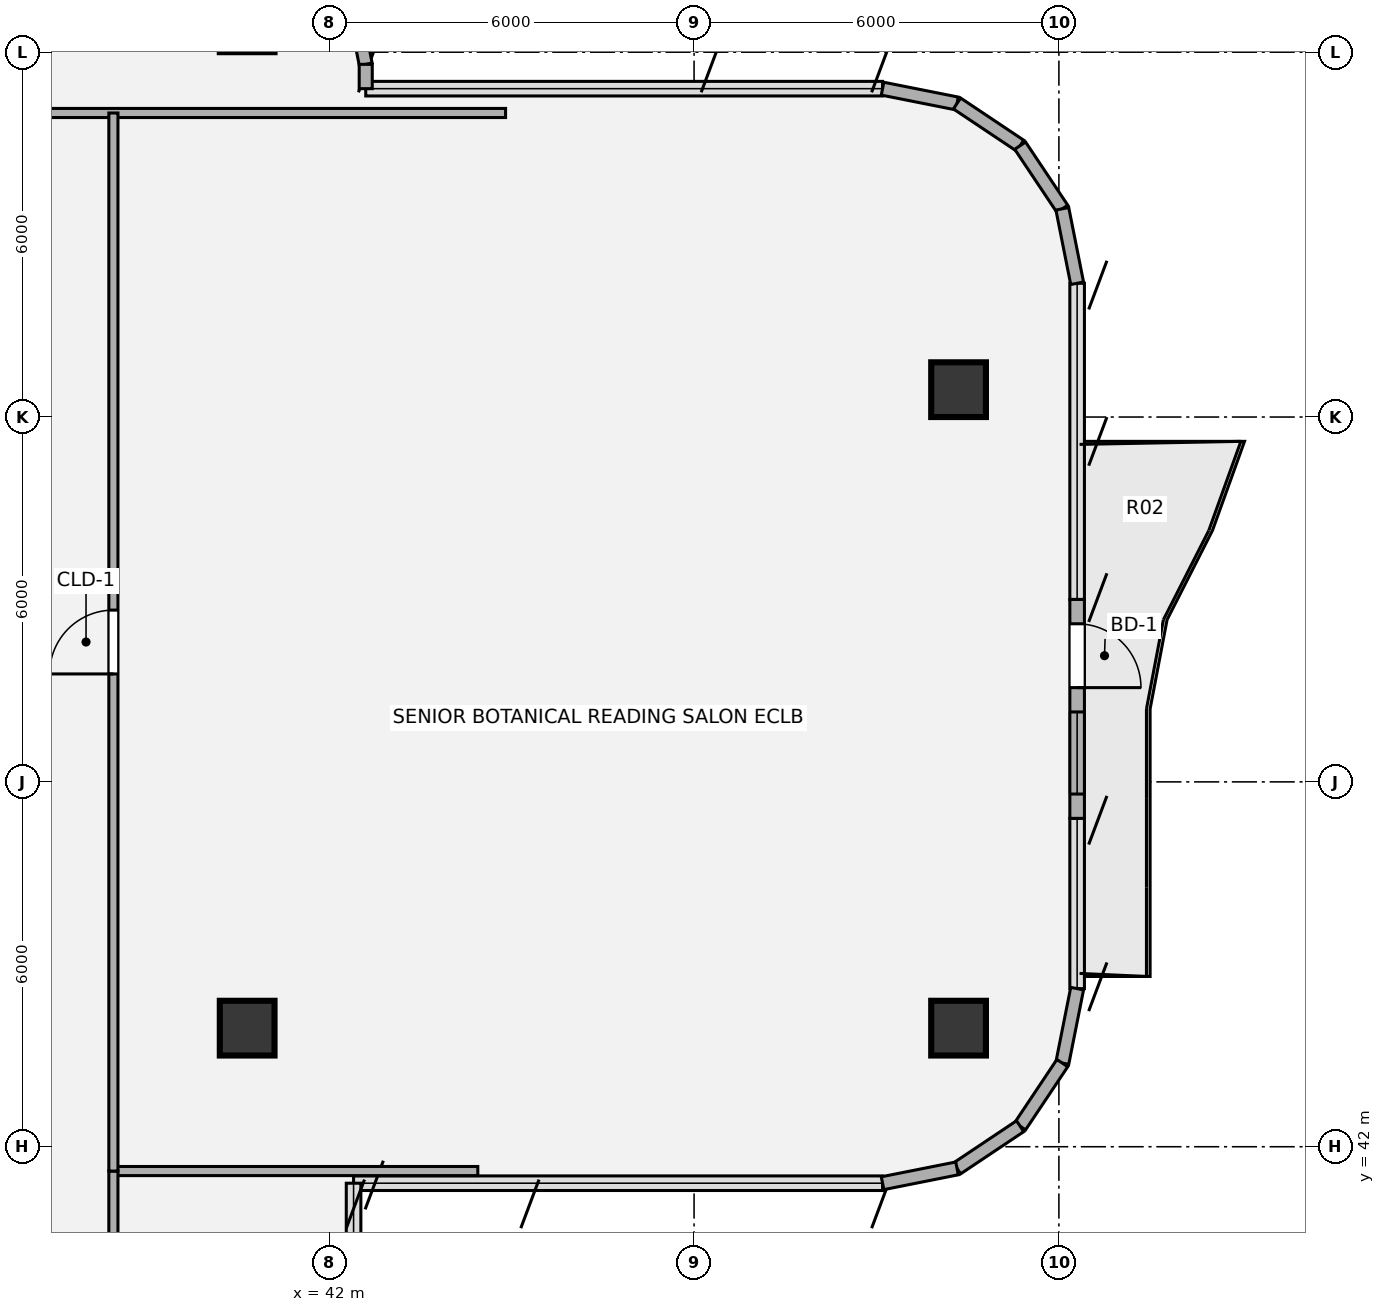
"""IFC4 building model, lengths in metres.
Left out: names, types, materials, properties, quantities, classifications, styles, units other than length and angle.
Written with IfcOpenShell. Run it as: python <this file> out.ifc"""

import sys

from ifc_helpers import new_model, si_unit, direction, frame, frame_2d, origin, origin_2d, place, context, subcontext, project, spatial, rectangle, hollow_circle, extrude, source, transform, mapped, element, fill, save


model = new_model("IFC4")
c1 = context("Model", 3, precision=1e-05, world=origin(), true_north=direction((0.0, 1.0)))
c2 = subcontext(c1, "Body", "Model", "MODEL_VIEW")
j1 = project(units=[si_unit("LENGTHUNIT", "METRE"), si_unit("PLANEANGLEUNIT", "RADIAN")], contexts=[c1])
p1 = place(None, origin())
s1 = spatial("IfcSite", under=j1, at=p1, CompositionType="ELEMENT")
p2 = place(p1, origin())
s2 = spatial("IfcBuilding", under=s1, at=p2, CompositionType="ELEMENT")
p3 = place(p2, frame((0.0, 0.0, 253.26)))
s3 = spatial("IfcBuildingStorey", under=s2, at=p3, CompositionType="ELEMENT", Elevation=253.26)
m1 = source(origin(), c2, "Body", "SweptSolid", [
    extrude(hollow_circle(Radius=0.45, WallThickness=0.032, at=origin_2d()), origin(), (0.0, 0.0, 1.0), 3.78),
])
for number, where, z_axis, x_axis in (
    (1, (52.35, 43.95, 0.0), (0.0, 0.0, 1.0), (1.0, 0.0, 0.0)),
    (2, (52.35, 54.45, 0.0), (0.0, 0.0, 1.0), (1.0, 0.0, 0.0)),
    (3, (40.65, 43.95, 0.0), (0.0, 0.0, 1.0), (1.0, 0.0, 0.0)),
):
    element("IfcColumn", number, at=place(p3, frame(where, z_axis=z_axis, x_axis=x_axis)), inside=s3, PredefinedType="COLUMN", context=c2, shape_type="MappedRepresentation", body=[
        mapped(m1, transform((0.0, 0.0, 0.0), x_axis=(1.0, 0.0, 0.0), y_axis=(0.0, 1.0, 0.0), z_axis=(0.0, 0.0, 1.0), scale=1.0)),
    ])
p4 = place(p3, frame((42.402, 60.795, 0.0), z_axis=(0.0, 0.0, 1.0), x_axis=(0.195190360752, -0.980765376158, 0.0)))
e4 = element("IfcWall", 4, at=p4, inside=s3, PredefinedType="SOLIDWALL", context=c2, shape_type="SweptSolid", body=[
    extrude(rectangle(XDim=1.014, YDim=0.215, at=frame_2d((0.507, 0.0))), origin(), (0.0, 0.0, 1.0), 3.53),
])
p5 = place(p3, frame((42.6, 59.8, 0.0), z_axis=(0.0, 0.0, 1.0), x_axis=(0.0, -1.0, 0.0)))
e5 = element("IfcWall", 5, at=p5, inside=s3, PredefinedType="SOLIDWALL", context=c2, shape_type="SweptSolid", body=[
    extrude(rectangle(XDim=0.4, YDim=0.215, at=frame_2d((0.2, 0.0))), origin(), (0.0, 0.0, 1.0), 3.53),
])
for number, where, z_axis, x_axis in (
    (6, (51.1, 59.4, 0.0), (0.0, 0.0, 1.0), (0.981, -0.195, 0.0)),
    (7, (52.325, 59.156, 0.0), (0.0, 0.0, 1.0), (0.831, -0.556, 0.0)),
    (8, (53.363, 58.463, 0.0), (0.0, 0.0, 1.0), (0.556, -0.831, 0.0)),
    (9, (54.056, 57.425, 0.0), (0.0, 0.0, 1.0), (0.195, -0.981, 0.0)),
):
    element("IfcWall", number, at=place(p3, frame(where, z_axis=z_axis, x_axis=x_axis)), inside=s3, PredefinedType="SOLIDWALL", context=c2, shape_type="SweptSolid", body=[
        extrude(rectangle(XDim=1.249, YDim=0.215, at=frame_2d((0.624, 0.0))), origin(), (0.0, 0.0, 1.0), 3.53),
    ])
p6 = place(p3, frame((54.3, 51.0, 0.0), z_axis=(0.0, 0.0, 1.0), x_axis=(0.0, -1.0, 0.0)))
e10 = element("IfcWall", 10, at=p6, inside=s3, PredefinedType="SOLIDWALL", context=c2, shape_type="SweptSolid", body=[
    extrude(rectangle(XDim=3.6, YDim=0.24, at=frame_2d((1.8, 0.0))), origin(), (0.0, 0.0, 1.0), 3.53),
])
p7 = place(p6, frame((0.4, 0.0, 0.0)))
e11 = element("IfcOpeningElement", 11, at=p7, cuts=e10, PredefinedType="OPENING", context=c2, shape_type="SweptSolid", body=[
    extrude(rectangle(XDim=1.05, YDim=2.15, at=origin_2d()), frame((0.525, 0.13, 1.075), z_axis=(0.0, -1.0, 0.0), x_axis=(1.0, 0.0, 0.0)), (0.0, 0.0, 1.0), 0.26),
])
p8 = place(p6, frame((1.85, 0.0, 0.85)))
e12 = element("IfcOpeningElement", 12, at=p8, cuts=e10, PredefinedType="OPENING", context=c2, shape_type="SweptSolid", body=[
    extrude(rectangle(XDim=1.35, YDim=1.35, at=origin_2d()), frame((0.675, 0.13, 0.675), z_axis=(0.0, -1.0, 0.0), x_axis=(1.0, 0.0, 0.0)), (0.0, 0.0, 1.0), 0.26),
])
for number, where, z_axis, x_axis in (
    (13, (54.3, 44.6, 0.0), (0.0, 0.0, 1.0), (-0.195, -0.981, 0.0)),
    (14, (54.056, 43.375, 0.0), (0.0, 0.0, 1.0), (-0.556, -0.831, 0.0)),
    (15, (53.363, 42.337, 0.0), (0.0, 0.0, 1.0), (-0.831, -0.556, 0.0)),
    (16, (52.325, 41.644, 0.0), (0.0, 0.0, 1.0), (-0.981, -0.195, 0.0)),
):
    element("IfcWall", number, at=place(p3, frame(where, z_axis=z_axis, x_axis=x_axis)), inside=s3, PredefinedType="SOLIDWALL", context=c2, shape_type="SweptSolid", body=[
        extrude(rectangle(XDim=1.249, YDim=0.215, at=frame_2d((0.624, 0.0))), origin(), (0.0, 0.0, 1.0), 3.53),
    ])
p9 = place(p3, frame((38.45, 41.6, 0.0), z_axis=(0.0, 0.0, 1.0), x_axis=(1.0, 0.0, 0.0)))
e17 = element("IfcWall", 17, at=p9, inside=s3, PredefinedType="PARTITIONING", context=c2, shape_type="SweptSolid", body=[
    extrude(rectangle(XDim=5.993, YDim=0.15, at=frame_2d((2.997, 0.0))), origin(), (0.0, 0.0, 1.0), 3.5),
])
p10 = place(p3, frame((27.1, 59.0, 0.0), z_axis=(0.0, 0.0, 1.0), x_axis=(1.0, 0.0, 0.0)))
e18 = element("IfcWall", 18, at=p10, inside=s3, PredefinedType="PARTITIONING", context=c2, shape_type="SweptSolid", body=[
    extrude(rectangle(XDim=17.8, YDim=0.15, at=frame_2d((8.9, 0.0))), origin(), (0.0, 0.0, 1.0), 3.308),
])
p11 = place(p10, frame((8.375, 0.0, 0.0)))
e19 = element("IfcOpeningElement", 19, at=p11, cuts=e18, PredefinedType="OPENING", context=c2, shape_type="SweptSolid", body=[
    extrude(rectangle(XDim=1.05, YDim=2.1, at=origin_2d()), frame((0.525, 0.085, 1.05), z_axis=(0.0, -1.0, 0.0), x_axis=(1.0, 0.0, 0.0)), (0.0, 0.0, 1.0), 0.17),
])
p12 = place(p3, frame((38.45, 21.2, 0.0), z_axis=(0.0, 0.0, 1.0), x_axis=(0.0, 1.0, 0.0)))
e20 = element("IfcWall", 20, at=p12, inside=s3, PredefinedType="PARTITIONING", context=c2, shape_type="SweptSolid", body=[
    extrude(rectangle(XDim=20.4, YDim=0.15, at=frame_2d((10.2, 0.0))), origin(), (0.0, 0.0, 1.0), 3.5),
])
p13 = place(p12, frame((9.575, 0.0, 0.0)))
e21 = element("IfcOpeningElement", 21, at=p13, cuts=e20, PredefinedType="OPENING", context=c2, shape_type="SweptSolid", body=[
    extrude(rectangle(XDim=1.05, YDim=2.1, at=origin_2d()), frame((0.525, 0.085, 1.05), z_axis=(0.0, -1.0, 0.0), x_axis=(1.0, 0.0, 0.0)), (0.0, 0.0, 1.0), 0.17),
])
p14 = place(p3, frame((38.45, 41.6, 0.0), z_axis=(0.0, 0.0, 1.0), x_axis=(0.0, 1.0, 0.0)))
e22 = element("IfcWall", 22, at=p14, inside=s3, PredefinedType="PARTITIONING", context=c2, shape_type="SweptSolid", body=[
    extrude(rectangle(XDim=17.4, YDim=0.15, at=frame_2d((8.7, 0.0))), origin(), (0.0, 0.0, 1.0), 3.5),
])
p15 = place(p14, frame((8.175, 0.0, 0.0)))
e23 = element("IfcOpeningElement", 23, at=p15, cuts=e22, PredefinedType="OPENING", context=c2, shape_type="SweptSolid", body=[
    extrude(rectangle(XDim=1.05, YDim=2.1, at=origin_2d()), frame((0.525, 0.085, 1.05), z_axis=(0.0, -1.0, 0.0), x_axis=(1.0, 0.0, 0.0)), (0.0, 0.0, 1.0), 0.17),
])
m2 = source(origin(), c2, "Body", "SweptSolid", [
    extrude(rectangle(XDim=1.05, YDim=2.15, at=origin_2d()), frame((0.525, 0.025, 1.075), z_axis=(0.0, -1.0, 0.0), x_axis=(1.0, 0.0, 0.0)), (0.0, 0.0, 1.0), 0.05),
])
p16 = place(p7, origin())
e24 = element("IfcDoor", 24, at=p16, inside=s3, OperationType="SINGLE_SWING_RIGHT", PredefinedType="DOOR", context=c2, shape_type="MappedRepresentation", body=[
    mapped(m2, transform((0.0, 0.0, 0.0), x_axis=(1.0, 0.0, 0.0), y_axis=(0.0, 1.0, 0.0), z_axis=(0.0, 0.0, 1.0), scale=1.0)),
])
fill(e11, e24)
m3 = source(origin(), c2, "Body", "SweptSolid", [
    extrude(rectangle(XDim=1.35, YDim=1.35, at=origin_2d()), frame((0.675, 0.03, 0.675), z_axis=(0.0, -1.0, 0.0), x_axis=(1.0, 0.0, 0.0)), (0.0, 0.0, 1.0), 0.06),
])
p17 = place(p8, origin())
e25 = element("IfcWindow", 25, at=p17, inside=s3, PartitioningType="SINGLE_PANEL", PredefinedType="WINDOW", context=c2, shape_type="MappedRepresentation", body=[
    mapped(m3, transform((0.0, 0.0, 0.0), x_axis=(1.0, 0.0, 0.0), y_axis=(0.0, 1.0, 0.0), z_axis=(0.0, 0.0, 1.0), scale=1.0)),
])
fill(e12, e25)
m4 = source(origin(), c2, "Body", "SweptSolid", [
    extrude(rectangle(XDim=1.05, YDim=2.1, at=origin_2d()), frame((0.525, 0.025, 1.05), z_axis=(0.0, -1.0, 0.0), x_axis=(1.0, 0.0, 0.0)), (0.0, 0.0, 1.0), 0.05),
])
p18 = place(p15, origin())
e26 = element("IfcDoor", 26, at=p18, inside=s3, OperationType="SINGLE_SWING_LEFT", PredefinedType="DOOR", context=c2, shape_type="MappedRepresentation", body=[
    mapped(m4, transform((0.0, 0.0, 0.0), x_axis=(1.0, 0.0, 0.0), y_axis=(0.0, 1.0, 0.0), z_axis=(0.0, 0.0, 1.0), scale=1.0)),
])
fill(e23, e26)
save(model, sys.argv[1])
